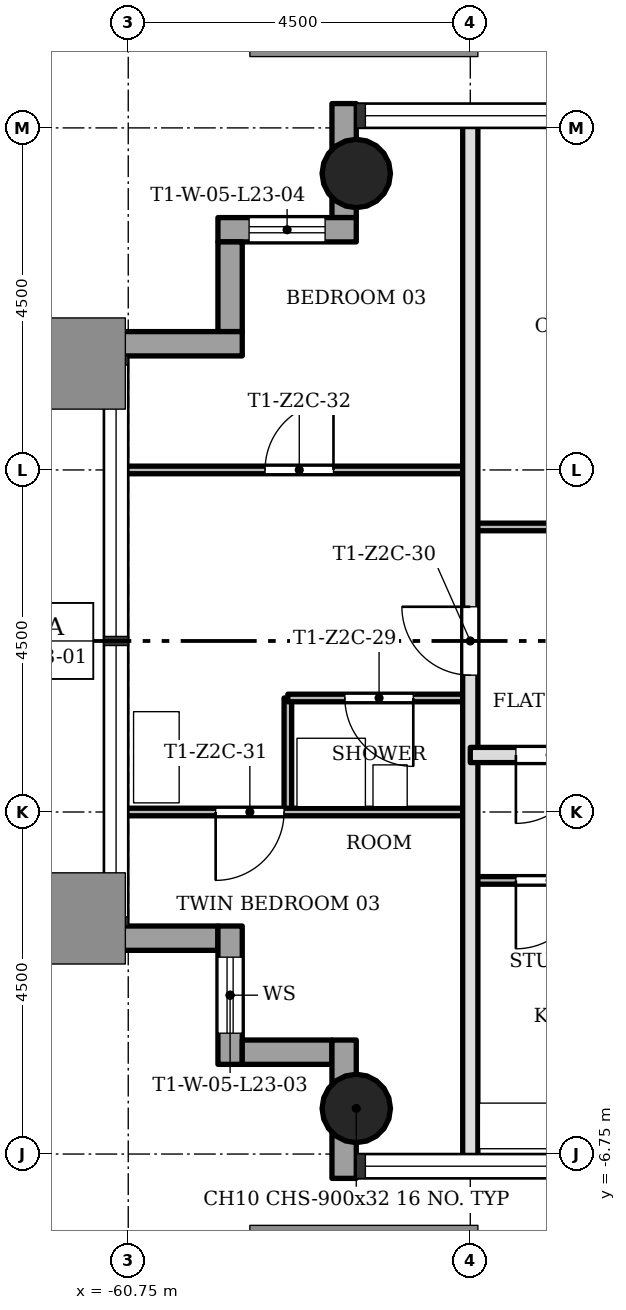
"""IFC4 building model, lengths in metres.
Left out: names, types, materials, properties, quantities, classifications, styles, units other than length and angle.
Written with IfcOpenShell. Run it as: python <this file> out.ifc"""

import sys

from ifc_helpers import new_model, si_unit, direction, frame, frame_2d, origin, origin_2d, place, context, subcontext, project, spatial, rectangle, hollow_circle, extrude, element, fill, save


model = new_model("IFC4")
c1 = context("Model", 3, precision=1e-05, world=origin(), true_north=direction((0.0, 1.0)))
c2 = subcontext(c1, "Body", "Model", "MODEL_VIEW")
j1 = project(units=[si_unit("LENGTHUNIT", "METRE"), si_unit("PLANEANGLEUNIT", "RADIAN")], contexts=[c1])
p1 = place(None, origin())
s1 = spatial("IfcSite", under=j1, at=p1, CompositionType="ELEMENT")
p2 = place(p1, origin())
s2 = spatial("IfcBuilding", under=s1, at=p2, CompositionType="ELEMENT")
p3 = place(p2, frame((0.0, 0.0, 86.8)))
s3 = spatial("IfcBuildingStorey", under=s2, at=p3, CompositionType="ELEMENT", Elevation=86.8)
for number, where, z_axis, x_axis in (
    (1, (-57.75, -6.15, 0.0), (0.0, 0.0, 1.0), (1.0, 0.0, 0.0)),
    (2, (-57.75, 6.15, 0.0), (0.0, 0.0, 1.0), (1.0, 0.0, 0.0)),
):
    element("IfcColumn", number, at=place(p3, frame(where, z_axis=z_axis, x_axis=x_axis)), inside=s3, PredefinedType="COLUMN", context=c2, shape_type="SweptSolid", body=[
        extrude(hollow_circle(Radius=0.45, WallThickness=0.032, at=origin_2d()), origin(), (0.0, 0.0, 1.0), 3.4),
    ])
p4 = place(p3, frame((-61.07, -3.91, -0.3), z_axis=(0.0, 0.0, 1.0), x_axis=(1.0, 0.0, 0.0)))
e3 = element("IfcWall", 3, at=p4, inside=s3, PredefinedType="STANDARD", context=c2, shape_type="SweptSolid", body=[
    extrude(rectangle(XDim=1.5, YDim=0.32, at=frame_2d((0.75, 0.0))), origin(), (0.0, 0.0, 1.0), 3.4),
])
p5 = place(p3, frame((-59.41, -3.75, -0.3), z_axis=(0.0, 0.0, 1.0), x_axis=(0.0, -1.0, 0.0)))
e4 = element("IfcWall", 4, at=p5, inside=s3, PredefinedType="STANDARD", context=c2, shape_type="SweptSolid", body=[
    extrude(rectangle(XDim=1.82, YDim=0.32, at=frame_2d((0.91, 0.0))), origin(), (0.0, 0.0, 1.0), 3.4),
])
p6 = place(p5, frame((0.41, 0.0, 1.2)))
e5 = element("IfcOpeningElement", 5, at=p6, cuts=e4, PredefinedType="OPENING", context=c2, shape_type="SweptSolid", body=[
    extrude(rectangle(XDim=1.0, YDim=1.5, at=frame_2d((0.5, 0.75))), frame((0.0, 0.17, 0.0), z_axis=(0.0, -1.0, 0.0), x_axis=(1.0, 0.0, 0.0)), (0.0, 0.0, 1.0), 0.34),
])
p7 = place(p3, frame((-59.25, -5.41, -0.3), z_axis=(0.0, 0.0, 1.0), x_axis=(1.0, 0.0, 0.0)))
e6 = element("IfcWall", 6, at=p7, inside=s3, PredefinedType="STANDARD", context=c2, shape_type="SweptSolid", body=[
    extrude(rectangle(XDim=1.18, YDim=0.32, at=frame_2d((0.59, 0.0))), origin(), (0.0, 0.0, 1.0), 3.4),
])
p8 = place(p3, frame((-57.91, -5.25, -0.3), z_axis=(0.0, 0.0, 1.0), x_axis=(0.0, -1.0, 0.0)))
e7 = element("IfcWall", 7, at=p8, inside=s3, PredefinedType="STANDARD", context=c2, shape_type="SweptSolid", body=[
    extrude(rectangle(XDim=1.82, YDim=0.32, at=frame_2d((0.91, 0.0))), origin(), (0.0, 0.0, 1.0), 3.4),
])
p9 = place(p3, frame((-57.91, 7.07, -0.3), z_axis=(0.0, 0.0, 1.0), x_axis=(0.0, -1.0, 0.0)))
e8 = element("IfcWall", 8, at=p9, inside=s3, PredefinedType="STANDARD", context=c2, shape_type="SweptSolid", body=[
    extrude(rectangle(XDim=1.5, YDim=0.32, at=frame_2d((0.75, 0.0))), origin(), (0.0, 0.0, 1.0), 3.4),
])
p10 = place(p3, frame((-57.75, 5.41, -0.3), z_axis=(0.0, 0.0, 1.0), x_axis=(-1.0, 0.0, 0.0)))
e9 = element("IfcWall", 9, at=p10, inside=s3, PredefinedType="STANDARD", context=c2, shape_type="SweptSolid", body=[
    extrude(rectangle(XDim=1.82, YDim=0.32, at=frame_2d((0.91, 0.0))), origin(), (0.0, 0.0, 1.0), 3.4),
])
p11 = place(p10, frame((0.41, 0.0, 1.2)))
e10 = element("IfcOpeningElement", 10, at=p11, cuts=e9, PredefinedType="OPENING", context=c2, shape_type="SweptSolid", body=[
    extrude(rectangle(XDim=1.0, YDim=1.5, at=frame_2d((0.5, 0.75))), frame((0.0, 0.17, 0.0), z_axis=(0.0, -1.0, 0.0), x_axis=(1.0, 0.0, 0.0)), (0.0, 0.0, 1.0), 0.34),
])
p12 = place(p3, frame((-59.41, 5.25, -0.3), z_axis=(0.0, 0.0, 1.0), x_axis=(0.0, -1.0, 0.0)))
e11 = element("IfcWall", 11, at=p12, inside=s3, PredefinedType="STANDARD", context=c2, shape_type="SweptSolid", body=[
    extrude(rectangle(XDim=1.18, YDim=0.32, at=frame_2d((0.59, 0.0))), origin(), (0.0, 0.0, 1.0), 3.4),
])
p13 = place(p3, frame((-59.25, 3.91, -0.3), z_axis=(0.0, 0.0, 1.0), x_axis=(-1.0, 0.0, 0.0)))
e12 = element("IfcWall", 12, at=p13, inside=s3, PredefinedType="STANDARD", context=c2, shape_type="SweptSolid", body=[
    extrude(rectangle(XDim=1.82, YDim=0.32, at=frame_2d((0.91, 0.0))), origin(), (0.0, 0.0, 1.0), 3.4),
])
p14 = place(p3, frame((-58.65, -2.25, 0.0), z_axis=(0.0, 0.0, 1.0), x_axis=(0.0, 1.0, 0.0)))
e13 = element("IfcWall", 13, at=p14, inside=s3, PredefinedType="PARTITIONING", context=c2, shape_type="SweptSolid", body=[
    extrude(rectangle(XDim=1.5, YDim=0.1, at=frame_2d((0.75, 0.0))), origin(), (0.0, 0.0, 1.0), 3.0),
])
p15 = place(p3, frame((-56.25, -6.85, 0.0), z_axis=(0.0, 0.0, 1.0), x_axis=(0.0, 1.0, 0.0)))
e14 = element("IfcWall", 14, at=p15, inside=s3, PredefinedType="SOLIDWALL", context=c2, shape_type="SweptSolid", body=[
    extrude(rectangle(XDim=13.7, YDim=0.2, at=frame_2d((6.85, 0.0))), origin(), (0.0, 0.0, 1.0), 3.0),
])
p16 = place(p15, frame((6.4, 0.0, 0.0)))
e15 = element("IfcOpeningElement", 15, at=p16, cuts=e14, PredefinedType="OPENING", context=c2, shape_type="SweptSolid", body=[
    extrude(rectangle(XDim=0.9, YDim=2.1, at=frame_2d((0.45, 1.05))), frame((0.0, 0.11, 0.0), z_axis=(0.0, -1.0, 0.0), x_axis=(1.0, 0.0, 0.0)), (0.0, 0.0, 1.0), 0.22),
])
p17 = place(p3, frame((-56.25, -3.15, 0.0), z_axis=(0.0, 0.0, 1.0), x_axis=(1.0, 0.0, 0.0)))
e16 = element("IfcWall", 16, at=p17, inside=s3, PredefinedType="PARTITIONING", context=c2, shape_type="SweptSolid", body=[
    extrude(rectangle(XDim=4.5, YDim=0.1, at=frame_2d((2.25, 0.0))), origin(), (0.0, 0.0, 1.0), 3.0),
])
p18 = place(p17, frame((0.6, 0.0, 0.0)))
e17 = element("IfcOpeningElement", 17, at=p18, cuts=e16, PredefinedType="OPENING", context=c2, shape_type="SweptSolid", body=[
    extrude(rectangle(XDim=0.9, YDim=2.1, at=frame_2d((0.45, 1.05))), frame((0.0, 0.06, 0.0), z_axis=(0.0, -1.0, 0.0), x_axis=(1.0, 0.0, 0.0)), (0.0, 0.0, 1.0), 0.12),
])
p19 = place(p3, frame((-60.85, -2.25, 0.0), z_axis=(0.0, 0.0, 1.0), x_axis=(1.0, 0.0, 0.0)))
e18 = element("IfcWall", 18, at=p19, inside=s3, PredefinedType="PARTITIONING", context=c2, shape_type="SweptSolid", body=[
    extrude(rectangle(XDim=4.6, YDim=0.1, at=frame_2d((2.3, 0.0))), origin(), (0.0, 0.0, 1.0), 3.0),
])
p20 = place(p19, frame((1.25, 0.0, 0.0)))
e19 = element("IfcOpeningElement", 19, at=p20, cuts=e18, PredefinedType="OPENING", context=c2, shape_type="SweptSolid", body=[
    extrude(rectangle(XDim=0.9, YDim=2.1, at=frame_2d((0.45, 1.05))), frame((0.0, 0.06, 0.0), z_axis=(0.0, -1.0, 0.0), x_axis=(1.0, 0.0, 0.0)), (0.0, 0.0, 1.0), 0.12),
])
p21 = place(p3, frame((-56.25, -1.5, 0.0), z_axis=(0.0, 0.0, 1.0), x_axis=(1.0, 0.0, 0.0)))
e20 = element("IfcWall", 20, at=p21, inside=s3, PredefinedType="SOLIDWALL", context=c2, shape_type="SweptSolid", body=[
    extrude(rectangle(XDim=4.5, YDim=0.2, at=frame_2d((2.25, 0.0))), origin(), (0.0, 0.0, 1.0), 3.0),
])
p22 = place(p21, frame((0.6, 0.0, 0.0)))
e21 = element("IfcOpeningElement", 21, at=p22, cuts=e20, PredefinedType="OPENING", context=c2, shape_type="SweptSolid", body=[
    extrude(rectangle(XDim=0.9, YDim=2.1, at=frame_2d((0.45, 1.05))), frame((0.0, 0.11, 0.0), z_axis=(0.0, -1.0, 0.0), x_axis=(1.0, 0.0, 0.0)), (0.0, 0.0, 1.0), 0.22),
])
p23 = place(p3, frame((-58.65, -0.75, 0.0), z_axis=(0.0, 0.0, 1.0), x_axis=(1.0, 0.0, 0.0)))
e22 = element("IfcWall", 22, at=p23, inside=s3, PredefinedType="PARTITIONING", context=c2, shape_type="SweptSolid", body=[
    extrude(rectangle(XDim=2.4, YDim=0.1, at=frame_2d((1.2, 0.0))), origin(), (0.0, 0.0, 1.0), 3.0),
])
p24 = place(p23, frame((0.75, 0.0, 0.0)))
e23 = element("IfcOpeningElement", 23, at=p24, cuts=e22, PredefinedType="OPENING", context=c2, shape_type="SweptSolid", body=[
    extrude(rectangle(XDim=0.9, YDim=2.1, at=frame_2d((0.45, 1.05))), frame((0.0, 0.06, 0.0), z_axis=(0.0, -1.0, 0.0), x_axis=(1.0, 0.0, 0.0)), (0.0, 0.0, 1.0), 0.12),
])
p25 = place(p3, frame((-56.25, 1.5, 0.0), z_axis=(0.0, 0.0, 1.0), x_axis=(1.0, 0.0, 0.0)))
e24 = element("IfcWall", 24, at=p25, inside=s3, PredefinedType="PARTITIONING", context=c2, shape_type="SweptSolid", body=[
    extrude(rectangle(XDim=4.5, YDim=0.1, at=frame_2d((2.25, 0.0))), origin(), (0.0, 0.0, 1.0), 3.0),
])
p26 = place(p25, frame((1.8, 0.0, 0.0)))
e25 = element("IfcOpeningElement", 25, at=p26, cuts=e24, PredefinedType="OPENING", context=c2, shape_type="SweptSolid", body=[
    extrude(rectangle(XDim=0.9, YDim=2.1, at=frame_2d((0.45, 1.05))), frame((0.0, 0.06, 0.0), z_axis=(0.0, -1.0, 0.0), x_axis=(1.0, 0.0, 0.0)), (0.0, 0.0, 1.0), 0.12),
])
p27 = place(p3, frame((-60.85, 2.25, 0.0), z_axis=(0.0, 0.0, 1.0), x_axis=(1.0, 0.0, 0.0)))
e26 = element("IfcWall", 26, at=p27, inside=s3, PredefinedType="PARTITIONING", context=c2, shape_type="SweptSolid", body=[
    extrude(rectangle(XDim=4.6, YDim=0.1, at=frame_2d((2.3, 0.0))), origin(), (0.0, 0.0, 1.0), 3.0),
])
p28 = place(p27, frame((1.9, 0.0, 0.0)))
e27 = element("IfcOpeningElement", 27, at=p28, cuts=e26, PredefinedType="OPENING", context=c2, shape_type="SweptSolid", body=[
    extrude(rectangle(XDim=0.9, YDim=2.1, at=frame_2d((0.45, 1.05))), frame((0.0, 0.06, 0.0), z_axis=(0.0, -1.0, 0.0), x_axis=(1.0, 0.0, 0.0)), (0.0, 0.0, 1.0), 0.12),
])
p29 = place(p22, origin())
e28 = element("IfcDoor", 28, at=p29, inside=s3, OperationType="SINGLE_SWING_LEFT", PredefinedType="DOOR", context=c2, shape_type="SweptSolid", body=[
    extrude(rectangle(XDim=0.9, YDim=2.1, at=frame_2d((0.45, 1.05))), frame((0.0, 0.025, 0.0), z_axis=(0.0, -1.0, 0.0), x_axis=(1.0, 0.0, 0.0)), (0.0, 0.0, 1.0), 0.05),
])
fill(e21, e28)
p30 = place(p18, origin())
e29 = element("IfcDoor", 29, at=p30, inside=s3, OperationType="SINGLE_SWING_LEFT", PredefinedType="DOOR", context=c2, shape_type="SweptSolid", body=[
    extrude(rectangle(XDim=0.9, YDim=2.1, at=frame_2d((0.45, 1.05))), frame((0.0, 0.025, 0.0), z_axis=(0.0, -1.0, 0.0), x_axis=(1.0, 0.0, 0.0)), (0.0, 0.0, 1.0), 0.05),
])
fill(e17, e29)
p31 = place(p24, origin())
e30 = element("IfcDoor", 30, at=p31, inside=s3, OperationType="SINGLE_SWING_RIGHT", PredefinedType="DOOR", context=c2, shape_type="SweptSolid", body=[
    extrude(rectangle(XDim=0.9, YDim=2.1, at=frame_2d((0.45, 1.05))), frame((0.0, 0.025, 0.0), z_axis=(0.0, -1.0, 0.0), x_axis=(1.0, 0.0, 0.0)), (0.0, 0.0, 1.0), 0.05),
])
fill(e23, e30)
p32 = place(p16, origin())
e31 = element("IfcDoor", 31, at=p32, inside=s3, OperationType="SINGLE_SWING_LEFT", PredefinedType="DOOR", context=c2, shape_type="SweptSolid", body=[
    extrude(rectangle(XDim=0.9, YDim=2.1, at=frame_2d((0.45, 1.05))), frame((0.0, 0.025, 0.0), z_axis=(0.0, -1.0, 0.0), x_axis=(1.0, 0.0, 0.0)), (0.0, 0.0, 1.0), 0.05),
])
fill(e15, e31)
p33 = place(p20, origin())
e32 = element("IfcDoor", 32, at=p33, inside=s3, OperationType="SINGLE_SWING_LEFT", PredefinedType="DOOR", context=c2, shape_type="SweptSolid", body=[
    extrude(rectangle(XDim=0.9, YDim=2.1, at=frame_2d((0.45, 1.05))), frame((0.0, 0.025, 0.0), z_axis=(0.0, -1.0, 0.0), x_axis=(1.0, 0.0, 0.0)), (0.0, 0.0, 1.0), 0.05),
])
fill(e19, e32)
p34 = place(p28, origin())
e33 = element("IfcDoor", 33, at=p34, inside=s3, OperationType="SINGLE_SWING_LEFT", PredefinedType="DOOR", context=c2, shape_type="SweptSolid", body=[
    extrude(rectangle(XDim=0.9, YDim=2.1, at=frame_2d((0.45, 1.05))), frame((0.0, 0.025, 0.0), z_axis=(0.0, -1.0, 0.0), x_axis=(1.0, 0.0, 0.0)), (0.0, 0.0, 1.0), 0.05),
])
fill(e27, e33)
p35 = place(p6, origin())
e34 = element("IfcWindow", 34, at=p35, inside=s3, PartitioningType="SINGLE_PANEL", PredefinedType="WINDOW", context=c2, shape_type="SweptSolid", body=[
    extrude(rectangle(XDim=1.0, YDim=1.5, at=frame_2d((0.5, 0.75))), frame((0.0, 0.03, 0.0), z_axis=(0.0, -1.0, 0.0), x_axis=(1.0, 0.0, 0.0)), (0.0, 0.0, 1.0), 0.06),
])
fill(e5, e34)
p36 = place(p11, origin())
e35 = element("IfcWindow", 35, at=p36, inside=s3, PartitioningType="SINGLE_PANEL", PredefinedType="WINDOW", context=c2, shape_type="SweptSolid", body=[
    extrude(rectangle(XDim=1.0, YDim=1.5, at=frame_2d((0.5, 0.75))), frame((0.0, 0.03, 0.0), z_axis=(0.0, -1.0, 0.0), x_axis=(1.0, 0.0, 0.0)), (0.0, 0.0, 1.0), 0.06),
])
fill(e10, e35)
save(model, sys.argv[1])
